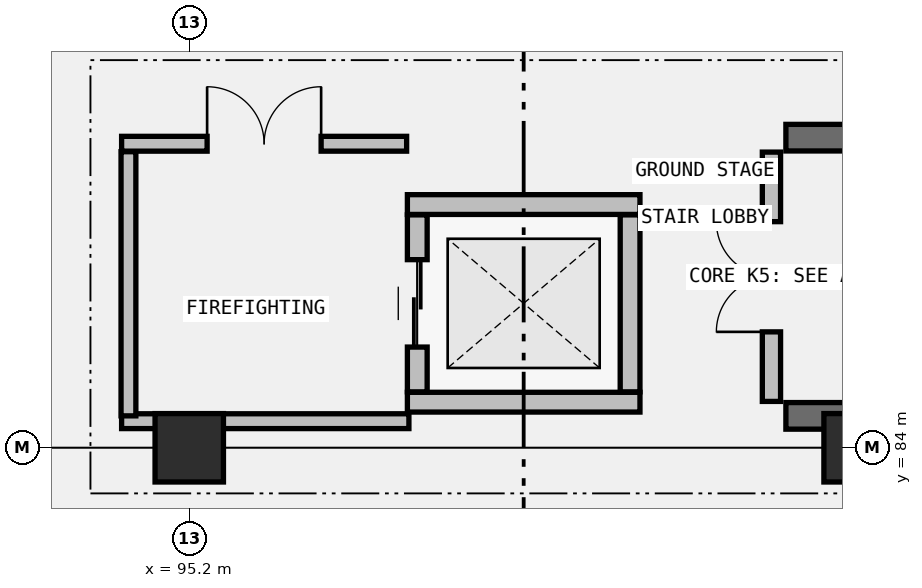
"""IFC4 building model, lengths in metres.
Left out: names, types, materials, properties, quantities, classifications, styles, units other than length and angle.
Written with IfcOpenShell. Run it as: python <this file> out.ifc"""

import sys

from ifc_helpers import new_model, si_unit, direction, frame, frame_2d, origin, origin_2d, place, context, subcontext, project, spatial, rectangle, extrude, element, fill, save


model = new_model("IFC4")
c1 = context("Model", 3, precision=1e-05, world=origin(), true_north=direction((0.0, 1.0)))
c2 = subcontext(c1, "Body", "Model", "MODEL_VIEW")
j1 = project(units=[si_unit("LENGTHUNIT", "METRE"), si_unit("PLANEANGLEUNIT", "RADIAN")], contexts=[c1])
p1 = place(None, origin())
s1 = spatial("IfcSite", under=j1, at=p1, CompositionType="ELEMENT")
p2 = place(p1, origin())
s2 = spatial("IfcBuilding", under=s1, at=p2, CompositionType="ELEMENT")
p3 = place(p2, origin())
s3 = spatial("IfcBuildingStorey", under=s2, at=p3, CompositionType="ELEMENT", Elevation=0.0)
for number, where, z_axis, x_axis in (
    (1, (95.2, 84.0, 0.0), (0.0, 0.0, 1.0), (1.0, 0.0, 0.0)),
    (2, (104.0, 84.0, 0.0), (0.0, 0.0, 1.0), (1.0, 0.0, 0.0)),
):
    element("IfcColumn", number, at=place(p3, frame(where, z_axis=z_axis, x_axis=x_axis)), inside=s3, PredefinedType="COLUMN", context=c2, shape_type="SweptSolid", body=[
        extrude(rectangle(XDim=0.9, YDim=0.9, at=origin_2d()), origin(), (0.0, 0.0, 1.0), 5.4),
    ])
for number, where, z_axis, x_axis in (
    (3, (103.05, 84.42, 0.0), (0.0, 0.0, 1.0), (1.0, 0.0, 0.0)),
    (4, (111.2, 88.08, 0.0), (0.0, 0.0, 1.0), (-1.0, 0.0, 0.0)),
):
    element("IfcWall", number, at=place(p3, frame(where, z_axis=z_axis, x_axis=x_axis)), inside=s3, PredefinedType="SHEAR", context=c2, shape_type="SweptSolid", body=[
        extrude(rectangle(XDim=8.15, YDim=0.35, at=frame_2d((4.075, 0.0))), origin(), (0.0, 0.0, 1.0), 5.16),
    ])
p4 = place(p3, frame((102.86, 84.61, 0.0), z_axis=(0.0, 0.0, 1.0), x_axis=(0.0, 1.0, 0.0)))
e5 = element("IfcWall", 5, at=p4, inside=s3, PredefinedType="STANDARD", context=c2, shape_type="SweptSolid", body=[
    extrude(rectangle(XDim=3.28, YDim=0.24, at=frame_2d((1.64, 0.0))), origin(), (0.0, 0.0, 1.0), 5.16),
])
p5 = place(p4, frame((0.915, 0.0, 0.0)))
e6 = element("IfcOpeningElement", 6, at=p5, cuts=e5, PredefinedType="OPENING", context=c2, shape_type="SweptSolid", body=[
    extrude(rectangle(XDim=1.45, YDim=2.2, at=frame_2d((0.725, 1.1))), frame((0.0, 0.13, 0.0), z_axis=(0.0, -1.0, 0.0), x_axis=(1.0, 0.0, 0.0)), (0.0, 0.0, 1.0), 0.26),
])
for number, where, z_axis, x_axis in (
    (7, (98.07, 84.6, 0.0), (0.0, 0.0, 1.0), (1.0, 0.0, 0.0)),
    (8, (98.07, 87.2, 0.0), (0.0, 0.0, 1.0), (1.0, 0.0, 0.0)),
):
    element("IfcWall", number, at=place(p3, frame(where, z_axis=z_axis, x_axis=x_axis)), inside=s3, PredefinedType="STANDARD", context=c2, shape_type="SweptSolid", body=[
        extrude(rectangle(XDim=3.06, YDim=0.26, at=frame_2d((1.53, 0.0))), origin(), (0.0, 0.0, 1.0), 5.16),
    ])
p6 = place(p3, frame((98.2, 84.736, 0.0), z_axis=(0.0, 0.0, 1.0), x_axis=(0.0, 1.0, 0.0)))
e9 = element("IfcWall", 9, at=p6, inside=s3, PredefinedType="STANDARD", context=c2, shape_type="SweptSolid", body=[
    extrude(rectangle(XDim=2.328, YDim=0.26, at=frame_2d((1.164, 0.0))), origin(), (0.0, 0.0, 1.0), 5.16),
])
p7 = place(p6, frame((0.589, 0.0, 0.0)))
e10 = element("IfcOpeningElement", 10, at=p7, cuts=e9, PredefinedType="OPENING", context=c2, shape_type="SweptSolid", body=[
    extrude(rectangle(XDim=1.15, YDim=2.15, at=frame_2d((0.575, 1.075))), frame((0.0, 0.14, 0.0), z_axis=(0.0, -1.0, 0.0), x_axis=(1.0, 0.0, 0.0)), (0.0, 0.0, 1.0), 0.28),
])
p8 = place(p3, frame((101.0, 84.736, 0.0), z_axis=(0.0, 0.0, 1.0), x_axis=(0.0, 1.0, 0.0)))
e11 = element("IfcWall", 11, at=p8, inside=s3, PredefinedType="STANDARD", context=c2, shape_type="SweptSolid", body=[
    extrude(rectangle(XDim=2.328, YDim=0.26, at=frame_2d((1.164, 0.0))), origin(), (0.0, 0.0, 1.0), 5.16),
])
p9 = place(p3, frame((94.31, 84.35, 0.0), z_axis=(0.0, 0.0, 1.0), x_axis=(1.0, 0.0, 0.0)))
e12 = element("IfcWall", 12, at=p9, inside=s3, PredefinedType="PARTITIONING", context=c2, shape_type="SweptSolid", body=[
    extrude(rectangle(XDim=3.78, YDim=0.195, at=frame_2d((1.89, 0.0))), origin(), (0.0, 0.0, 1.0), 5.16),
])
p10 = place(p3, frame((94.4, 84.42, 0.0), z_axis=(0.0, 0.0, 1.0), x_axis=(0.0, 1.0, 0.0)))
e13 = element("IfcWall", 13, at=p10, inside=s3, PredefinedType="PARTITIONING", context=c2, shape_type="SweptSolid", body=[
    extrude(rectangle(XDim=3.475, YDim=0.195, at=frame_2d((1.738, 0.0))), origin(), (0.0, 0.0, 1.0), 5.16),
])
p11 = place(p3, frame((94.31, 88.0, 0.0), z_axis=(0.0, 0.0, 1.0), x_axis=(1.0, 0.0, 0.0)))
e14 = element("IfcWall", 14, at=p11, inside=s3, PredefinedType="PARTITIONING", context=c2, shape_type="SweptSolid", body=[
    extrude(rectangle(XDim=3.75, YDim=0.195, at=frame_2d((1.875, 0.0))), origin(), (0.0, 0.0, 1.0), 5.16),
])
p12 = place(p11, frame((1.125, 0.0, 0.0)))
e15 = element("IfcOpeningElement", 15, at=p12, cuts=e14, PredefinedType="OPENING", context=c2, shape_type="SweptSolid", body=[
    extrude(rectangle(XDim=1.5, YDim=2.2, at=frame_2d((0.75, 1.1))), frame((0.0, 0.107, 0.0), z_axis=(0.0, -1.0, 0.0), x_axis=(1.0, 0.0, 0.0)), (0.0, 0.0, 1.0), 0.215),
])
p13 = place(p5, origin())
e16 = element("IfcDoor", 16, at=p13, inside=s3, OperationType="DOUBLE_DOOR_SINGLE_SWING", PredefinedType="DOOR", context=c2, shape_type="SweptSolid", body=[
    extrude(rectangle(XDim=1.45, YDim=2.2, at=frame_2d((0.725, 1.1))), frame((0.0, 0.025, 0.0), z_axis=(0.0, -1.0, 0.0), x_axis=(1.0, 0.0, 0.0)), (0.0, 0.0, 1.0), 0.05),
])
fill(e6, e16)
p14 = place(p7, origin())
e17 = element("IfcDoor", 17, at=p14, inside=s3, OperationType="SLIDING_TO_LEFT", PredefinedType="DOOR", context=c2, shape_type="SweptSolid", body=[
    extrude(rectangle(XDim=1.15, YDim=2.15, at=frame_2d((0.575, 1.075))), frame((0.0, 0.025, 0.0), z_axis=(0.0, -1.0, 0.0), x_axis=(1.0, 0.0, 0.0)), (0.0, 0.0, 1.0), 0.05),
])
fill(e10, e17)
p15 = place(p12, origin())
e18 = element("IfcDoor", 18, at=p15, inside=s3, OperationType="DOUBLE_DOOR_SINGLE_SWING", PredefinedType="DOOR", context=c2, shape_type="SweptSolid", body=[
    extrude(rectangle(XDim=1.5, YDim=2.2, at=frame_2d((0.75, 1.1))), frame((0.0, 0.025, 0.0), z_axis=(0.0, -1.0, 0.0), x_axis=(1.0, 0.0, 0.0)), (0.0, 0.0, 1.0), 0.05),
])
fill(e15, e18)
save(model, sys.argv[1])
